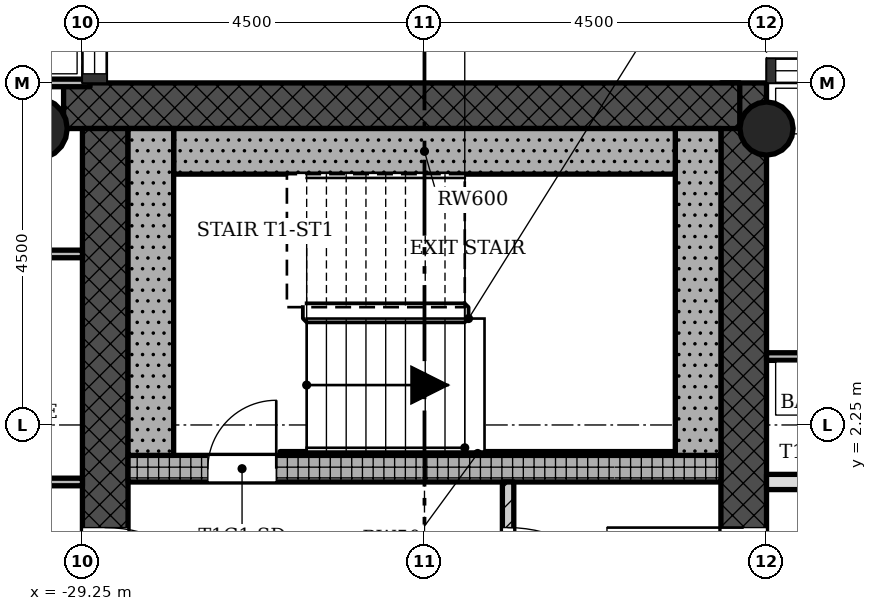
"""IFC4 building model, lengths in metres.
Left out: names, types, materials, properties, quantities, classifications, styles, units other than length and angle.
Written with IfcOpenShell. Run it as: python <this file> out.ifc"""

import sys

from ifc_helpers import new_model, si_unit, direction, frame, frame_2d, origin, origin_2d, place, context, subcontext, project, spatial, rectangle, hollow_circle, extrude, element, fill, save


model = new_model("IFC4")
c1 = context("Model", 3, precision=1e-05, world=origin(), true_north=direction((0.0, 1.0)))
c2 = subcontext(c1, "Body", "Model", "MODEL_VIEW")
j1 = project(units=[si_unit("LENGTHUNIT", "METRE"), si_unit("PLANEANGLEUNIT", "RADIAN")], contexts=[c1])
p1 = place(None, origin())
s1 = spatial("IfcSite", under=j1, at=p1, CompositionType="ELEMENT")
p2 = place(p1, origin())
s2 = spatial("IfcBuilding", under=s1, at=p2, CompositionType="ELEMENT")
p3 = place(p2, frame((0.0, 0.0, 199.4)))
s3 = spatial("IfcBuildingStorey", under=s2, at=p3, CompositionType="ELEMENT", Elevation=199.4)
p4 = place(p3, frame((-20.55, -6.15, 0.0), z_axis=(0.0, 0.0, 1.0), x_axis=(0.0, 1.0, 0.0)))
e1 = element("IfcWall", 1, at=p4, inside=s3, PredefinedType="SHEAR", context=c2, shape_type="SweptSolid", body=[
    extrude(rectangle(XDim=12.9, YDim=0.6, at=frame_2d((6.45, 0.0))), origin(), (0.0, 0.0, 1.0), 3.4),
])
p5 = place(p4, frame((5.25, 0.0, 0.0)))
e2 = element("IfcOpeningElement", 2, at=p5, cuts=e1, PredefinedType="OPENING", context=c2, shape_type="SweptSolid", body=[
    extrude(rectangle(XDim=1.8, YDim=2.1, at=frame_2d((0.9, 1.05))), frame((0.0, 0.31, 0.0), z_axis=(0.0, -1.0, 0.0), x_axis=(1.0, 0.0, 0.0)), (0.0, 0.0, 1.0), 0.62),
])
p6 = place(p3, frame((-20.602, 6.45, 0.0), z_axis=(0.0, 0.0, 1.0), x_axis=(-1.0, 0.0, 0.0)))
e3 = element("IfcWall", 3, at=p6, inside=s3, PredefinedType="SHEAR", context=c2, shape_type="SweptSolid", body=[
    extrude(rectangle(XDim=8.896, YDim=0.6, at=frame_2d((4.448, 0.0))), origin(), (0.0, 0.0, 1.0), 3.4),
])
p7 = place(p3, frame((-28.95, 6.15, 0.0), z_axis=(0.0, 0.0, 1.0), x_axis=(0.0, -1.0, 0.0)))
e4 = element("IfcWall", 4, at=p7, inside=s3, PredefinedType="SHEAR", context=c2, shape_type="SweptSolid", body=[
    extrude(rectangle(XDim=12.9, YDim=0.6, at=frame_2d((6.45, 0.0))), origin(), (0.0, 0.0, 1.0), 3.4),
])
p8 = place(p7, frame((5.25, 0.0, 0.0)))
e5 = element("IfcOpeningElement", 5, at=p8, cuts=e4, PredefinedType="OPENING", context=c2, shape_type="SweptSolid", body=[
    extrude(rectangle(XDim=1.8, YDim=2.1, at=frame_2d((0.9, 1.05))), frame((0.0, 0.31, 0.0), z_axis=(0.0, -1.0, 0.0), x_axis=(1.0, 0.0, 0.0)), (0.0, 0.0, 1.0), 0.62),
])
p9 = place(p3, frame((-28.65, 1.675, 0.0), z_axis=(0.0, 0.0, 1.0), x_axis=(1.0, 0.0, 0.0)))
e6 = element("IfcWall", 6, at=p9, inside=s3, PredefinedType="SHEAR", context=c2, shape_type="SweptSolid", body=[
    extrude(rectangle(XDim=7.8, YDim=0.35, at=frame_2d((3.9, 0.0))), origin(), (0.0, 0.0, 1.0), 3.4),
])
p10 = place(p9, frame((1.05, 0.0, 0.0)))
e7 = element("IfcOpeningElement", 7, at=p10, cuts=e6, PredefinedType="OPENING", context=c2, shape_type="SweptSolid", body=[
    extrude(rectangle(XDim=0.9, YDim=2.1, at=frame_2d((0.45, 1.05))), frame((0.0, 0.185, 0.0), z_axis=(0.0, -1.0, 0.0), x_axis=(1.0, 0.0, 0.0)), (0.0, 0.0, 1.0), 0.37),
])
p11 = place(p3, frame((-20.25, 6.15, 0.0), z_axis=(0.0, 0.0, 1.0), x_axis=(1.0, 0.0, 0.0)))
e8 = element("IfcColumn", 8, at=p11, inside=s3, PredefinedType="COLUMN", context=c2, shape_type="SweptSolid", body=[
    extrude(hollow_circle(Radius=0.35, WallThickness=0.025, at=origin_2d()), origin(), (0.0, 0.0, 1.0), 3.4),
])
p12 = place(p3, frame((-29.85, 6.15, 0.0), z_axis=(0.0, 0.0, 1.0), x_axis=(1.0, 0.0, 0.0)))
e9 = element("IfcColumn", 9, at=p12, inside=s3, PredefinedType="COLUMN", context=c2, shape_type="SweptSolid", body=[
    extrude(hollow_circle(Radius=0.4, WallThickness=0.028, at=origin_2d()), origin(), (0.0, 0.0, 1.0), 3.4),
])
p13 = place(p3, frame((-23.65, -1.5, 0.0), z_axis=(0.0, 0.0, 1.0), x_axis=(0.0, 1.0, 0.0)))
e10 = element("IfcWall", 10, at=p13, inside=s3, PredefinedType="PARTITIONING", context=c2, shape_type="SweptSolid", body=[
    extrude(rectangle(XDim=3.0, YDim=0.15, at=frame_2d((1.5, 0.0))), origin(), (0.0, 0.0, 1.0), 3.0),
])
p14 = place(p13, frame((0.6, 0.0, 0.0)))
e11 = element("IfcOpeningElement", 11, at=p14, cuts=e10, PredefinedType="OPENING", context=c2, shape_type="SweptSolid", body=[
    extrude(rectangle(XDim=1.8, YDim=2.1, at=frame_2d((0.9, 1.05))), frame((0.0, 0.085, 0.0), z_axis=(0.0, -1.0, 0.0), x_axis=(1.0, 0.0, 0.0)), (0.0, 0.0, 1.0), 0.17),
])
p15 = place(p3, frame((-31.5, 1.5, 0.0), z_axis=(0.0, 0.0, 1.0), x_axis=(1.0, 0.0, 0.0)))
e12 = element("IfcWall", 12, at=p15, inside=s3, PredefinedType="PARTITIONING", context=c2, shape_type="SweptSolid", body=[
    extrude(rectangle(XDim=2.25, YDim=0.1, at=frame_2d((1.125, 0.0))), origin(), (0.0, 0.0, 1.0), 3.0),
])
p16 = place(p3, frame((-20.25, 1.5, 0.0), z_axis=(0.0, 0.0, 1.0), x_axis=(1.0, 0.0, 0.0)))
e13 = element("IfcWall", 13, at=p16, inside=s3, PredefinedType="SOLIDWALL", context=c2, shape_type="SweptSolid", body=[
    extrude(rectangle(XDim=4.5, YDim=0.2, at=frame_2d((2.25, 0.0))), origin(), (0.0, 0.0, 1.0), 3.0),
])
p17 = place(p16, frame((3.0, 0.0, 0.0)))
e14 = element("IfcOpeningElement", 14, at=p17, cuts=e13, PredefinedType="OPENING", context=c2, shape_type="SweptSolid", body=[
    extrude(rectangle(XDim=0.9, YDim=2.1, at=frame_2d((0.45, 1.05))), frame((0.0, 0.11, 0.0), z_axis=(0.0, -1.0, 0.0), x_axis=(1.0, 0.0, 0.0)), (0.0, 0.0, 1.0), 0.22),
])
p18 = place(p3, frame((-20.25, 3.15, 0.0), z_axis=(0.0, 0.0, 1.0), x_axis=(1.0, 0.0, 0.0)))
e15 = element("IfcWall", 15, at=p18, inside=s3, PredefinedType="PARTITIONING", context=c2, shape_type="SweptSolid", body=[
    extrude(rectangle(XDim=4.5, YDim=0.1, at=frame_2d((2.25, 0.0))), origin(), (0.0, 0.0, 1.0), 3.0),
])
p19 = place(p18, frame((3.0, 0.0, 0.0)))
e16 = element("IfcOpeningElement", 16, at=p19, cuts=e15, PredefinedType="OPENING", context=c2, shape_type="SweptSolid", body=[
    extrude(rectangle(XDim=0.9, YDim=2.1, at=frame_2d((0.45, 1.05))), frame((0.0, 0.06, 0.0), z_axis=(0.0, -1.0, 0.0), x_axis=(1.0, 0.0, 0.0)), (0.0, 0.0, 1.0), 0.12),
])
p20 = place(p3, frame((-35.1, 4.5, 0.0), z_axis=(0.0, 0.0, 1.0), x_axis=(1.0, 0.0, 0.0)))
e17 = element("IfcWall", 17, at=p20, inside=s3, PredefinedType="PARTITIONING", context=c2, shape_type="SweptSolid", body=[
    extrude(rectangle(XDim=5.85, YDim=0.1, at=frame_2d((2.925, 0.0))), origin(), (0.0, 0.0, 1.0), 3.0),
])
p21 = place(p20, frame((1.35, 0.0, 0.0)))
e18 = element("IfcOpeningElement", 18, at=p21, cuts=e17, PredefinedType="OPENING", context=c2, shape_type="SweptSolid", body=[
    extrude(rectangle(XDim=0.9, YDim=2.1, at=frame_2d((0.45, 1.05))), frame((0.0, 0.06, 0.0), z_axis=(0.0, -1.0, 0.0), x_axis=(1.0, 0.0, 0.0)), (0.0, 0.0, 1.0), 0.12),
])
p22 = place(p3, frame((-35.1, 6.75, 0.0), z_axis=(0.0, 0.0, 1.0), x_axis=(1.0, 0.0, 0.0)))
e19 = element("IfcWall", 19, at=p22, inside=s3, PredefinedType="PARTITIONING", context=c2, shape_type="SweptSolid", body=[
    extrude(rectangle(XDim=5.95, YDim=0.1, at=frame_2d((2.975, 0.0))), origin(), (0.0, 0.0, 1.0), 3.0),
])
p23 = place(p3, frame((-21.15, 1.85, 0.0), z_axis=(0.0, 0.0, 1.0), x_axis=(0.0, 1.0, 0.0)))
e20 = element("IfcWall", 20, at=p23, inside=s3, PredefinedType="SHEAR", context=c2, shape_type="SweptSolid", body=[
    extrude(rectangle(XDim=4.3, YDim=0.6, at=frame_2d((2.15, 0.0))), origin(), (0.0, 0.0, 1.0), 3.4),
])
p24 = place(p3, frame((-28.05, 5.85, 0.0), z_axis=(0.0, 0.0, 1.0), x_axis=(1.0, 0.0, 0.0)))
e21 = element("IfcWall", 21, at=p24, inside=s3, PredefinedType="SHEAR", context=c2, shape_type="SweptSolid", body=[
    extrude(rectangle(XDim=6.6, YDim=0.6, at=frame_2d((3.3, 0.0))), origin(), (0.0, 0.0, 1.0), 3.4),
])
p25 = place(p3, frame((-28.35, 1.85, 0.0), z_axis=(0.0, 0.0, 1.0), x_axis=(0.0, 1.0, 0.0)))
e22 = element("IfcWall", 22, at=p25, inside=s3, PredefinedType="SHEAR", context=c2, shape_type="SweptSolid", body=[
    extrude(rectangle(XDim=4.3, YDim=0.6, at=frame_2d((2.15, 0.0))), origin(), (0.0, 0.0, 1.0), 3.4),
])
p26 = place(p3, frame((-26.65, 1.875, 0.0), z_axis=(0.0, 0.0, 1.0), x_axis=(1.0, 0.0, 0.0)))
e23 = element("IfcWall", 23, at=p26, inside=s3, PredefinedType="SHEAR", context=c2, shape_type="SweptSolid", body=[
    extrude(rectangle(XDim=5.2, YDim=0.05, at=frame_2d((2.6, 0.0))), origin(), (0.0, 0.0, 1.0), 3.4),
])
p27 = place(p14, origin())
e24 = element("IfcDoor", 24, at=p27, inside=s3, OperationType="SINGLE_SWING_LEFT", PredefinedType="DOOR", context=c2, shape_type="SweptSolid", body=[
    extrude(rectangle(XDim=1.8, YDim=2.1, at=frame_2d((0.9, 1.05))), frame((0.0, 0.025, 0.0), z_axis=(0.0, -1.0, 0.0), x_axis=(1.0, 0.0, 0.0)), (0.0, 0.0, 1.0), 0.05),
])
fill(e11, e24)
p28 = place(p10, origin())
e25 = element("IfcDoor", 25, at=p28, inside=s3, OperationType="SINGLE_SWING_LEFT", PredefinedType="DOOR", context=c2, shape_type="SweptSolid", body=[
    extrude(rectangle(XDim=0.9, YDim=2.1, at=frame_2d((0.45, 1.05))), frame((0.0, 0.025, 0.0), z_axis=(0.0, -1.0, 0.0), x_axis=(1.0, 0.0, 0.0)), (0.0, 0.0, 1.0), 0.05),
])
fill(e7, e25)
p29 = place(p8, origin())
e26 = element("IfcDoor", 26, at=p29, inside=s3, OperationType="SINGLE_SWING_LEFT", PredefinedType="DOOR", context=c2, shape_type="SweptSolid", body=[
    extrude(rectangle(XDim=1.8, YDim=2.1, at=frame_2d((0.9, 1.05))), frame((0.0, 0.025, 0.0), z_axis=(0.0, -1.0, 0.0), x_axis=(1.0, 0.0, 0.0)), (0.0, 0.0, 1.0), 0.05),
])
fill(e5, e26)
p30 = place(p5, origin())
e27 = element("IfcDoor", 27, at=p30, inside=s3, OperationType="SINGLE_SWING_LEFT", PredefinedType="DOOR", context=c2, shape_type="SweptSolid", body=[
    extrude(rectangle(XDim=1.8, YDim=2.1, at=frame_2d((0.9, 1.05))), frame((0.0, 0.025, 0.0), z_axis=(0.0, -1.0, 0.0), x_axis=(1.0, 0.0, 0.0)), (0.0, 0.0, 1.0), 0.05),
])
fill(e2, e27)
save(model, sys.argv[1])
